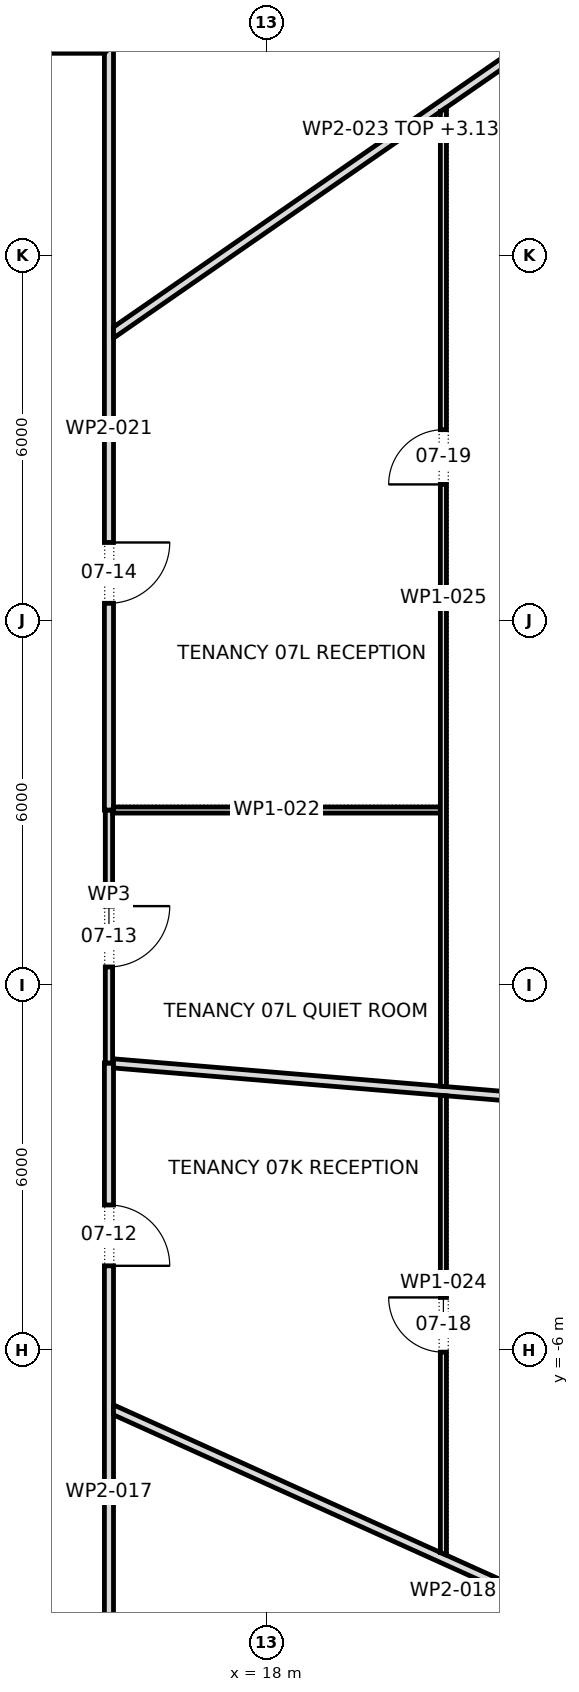
"""IFC4 building model, lengths in metres.
Left out: names, types, materials, properties, quantities, classifications, styles, units other than length and angle.
Written with IfcOpenShell. Run it as: python <this file> out.ifc"""

import sys

from ifc_helpers import new_model, si_unit, direction, frame, frame_2d, origin, place, context, subcontext, project, spatial, polyline, rectangle, outline, extrude, element, fill, save


model = new_model("IFC4")
c1 = context("Model", 3, precision=1e-05, world=origin(), true_north=direction((0.0, 1.0)))
c2 = subcontext(c1, "Body", "Model", "MODEL_VIEW")
j1 = project(units=[si_unit("LENGTHUNIT", "METRE"), si_unit("PLANEANGLEUNIT", "RADIAN")], contexts=[c1])
p1 = place(None, origin())
s1 = spatial("IfcSite", under=j1, at=p1, CompositionType="ELEMENT")
p2 = place(p1, origin())
s2 = spatial("IfcBuilding", under=s1, at=p2, CompositionType="ELEMENT")
p3 = place(p2, frame((0.0, 0.0, 104.5)))
s3 = spatial("IfcBuildingStorey", under=s2, at=p3, CompositionType="ELEMENT", Elevation=104.5)
p4 = place(p3, frame((-15.475, 15.4, 0.0), z_axis=(0.0, 0.0, 1.0), x_axis=(1.0, 0.0, 0.0)))
e1 = element("IfcWall", 1, at=p4, inside=s3, PredefinedType="PARTITIONING", context=c2, shape_type="SweptSolid", body=[
    extrude(outline(polyline([(0.15, -0.075), (2.066, -0.075), (3.981, -0.075), (5.897, -0.075), (7.812, -0.075), (9.728, -0.075), (11.644, -0.075), (13.56, -0.075), (15.475, -0.075), (17.391, -0.075), (19.306, -0.075), (21.222, -0.075), (23.138, -0.075), (25.053, -0.075), (26.969, -0.075), (28.885, -0.075), (30.8, -0.075), (30.95, 0.075), (29.016, 0.075), (27.081, 0.075), (25.147, 0.075), (23.212, 0.075), (21.278, 0.075), (19.344, 0.075), (17.409, 0.075), (15.475, 0.075), (13.541, 0.075), (11.606, 0.075), (9.672, 0.075), (7.738, 0.075), (5.803, 0.075), (3.869, 0.075), (1.935, 0.075), (0.0, 0.075), (0.15, -0.075)])), origin(), (0.0, 0.0, 1.0), 3.9),
])
p5 = place(p4, frame((27.545, 0.0, 0.0)))
e2 = element("IfcOpeningElement", 2, at=p5, cuts=e1, PredefinedType="OPENING", context=c2, shape_type="SweptSolid", body=[
    extrude(rectangle(XDim=1.0, YDim=2.1, at=frame_2d((0.5, 1.05))), frame((0.0, 0.087, 0.0), z_axis=(0.0, -1.0, 0.0), x_axis=(1.0, 0.0, 0.0)), (0.0, 0.0, 1.0), 0.174),
])
p6 = place(p4, frame((18.545, 0.0, 0.0)))
e3 = element("IfcOpeningElement", 3, at=p6, cuts=e1, PredefinedType="OPENING", context=c2, shape_type="SweptSolid", body=[
    extrude(rectangle(XDim=1.8, YDim=2.1, at=frame_2d((0.9, 1.05))), frame((0.0, 0.087, 0.0), z_axis=(0.0, -1.0, 0.0), x_axis=(1.0, 0.0, 0.0)), (0.0, 0.0, 1.0), 0.174),
])
p7 = place(p4, frame((6.195, 0.0, 0.0)))
e4 = element("IfcOpeningElement", 4, at=p7, cuts=e1, PredefinedType="OPENING", context=c2, shape_type="SweptSolid", body=[
    extrude(rectangle(XDim=1.8, YDim=2.1, at=frame_2d((0.9, 1.05))), frame((0.0, 0.087, 0.0), z_axis=(0.0, -1.0, 0.0), x_axis=(1.0, 0.0, 0.0)), (0.0, 0.0, 1.0), 0.174),
])
p8 = place(p3, frame((15.4, -15.475, 0.0), z_axis=(0.0, 0.0, 1.0), x_axis=(0.0, 1.0, 0.0)))
e5 = element("IfcWall", 5, at=p8, inside=s3, PredefinedType="PARTITIONING", context=c2, shape_type="SweptSolid", body=[
    extrude(outline(polyline([(14.195, 0.075), (12.439, 0.075), (10.684, 0.075), (8.928, 0.075), (7.173, 0.075), (5.417, 0.075), (3.661, 0.075), (1.906, 0.075), (0.15, 0.075), (0.0, -0.075), (1.775, -0.075), (3.549, -0.075), (5.323, -0.075), (7.098, -0.075), (8.872, -0.075), (10.646, -0.075), (12.421, -0.075), (14.195, -0.075), (14.195, 0.075)])), origin(), (0.0, 0.0, 1.0), 3.9),
])
p9 = place(p8, frame((3.8, 0.0, 0.0)))
e6 = element("IfcOpeningElement", 6, at=p9, cuts=e5, PredefinedType="OPENING", context=c2, shape_type="SweptSolid", body=[
    extrude(rectangle(XDim=1.0, YDim=2.1, at=frame_2d((0.5, 1.05))), frame((0.0, 0.087, 0.0), z_axis=(0.0, -1.0, 0.0), x_axis=(1.0, 0.0, 0.0)), (0.0, 0.0, 1.0), 0.174),
])
p10 = place(p8, frame((10.86, 0.0, 0.0)))
e7 = element("IfcOpeningElement", 7, at=p10, cuts=e5, PredefinedType="OPENING", context=c2, shape_type="SweptSolid", body=[
    extrude(rectangle(XDim=1.0, YDim=2.1, at=frame_2d((0.5, 1.05))), frame((0.0, 0.087, 0.0), z_axis=(0.0, -1.0, 0.0), x_axis=(1.0, 0.0, 0.0)), (0.0, 0.0, 1.0), 0.174),
])
p11 = place(p3, frame((15.444, -6.97, 0.0), z_axis=(0.0, 0.0, 1.0), x_axis=(0.911385678544, -0.411553331835, 0.0)))
e8 = element("IfcWall", 8, at=p11, inside=s3, PredefinedType="PARTITIONING", context=c2, shape_type="SweptSolid", body=[
    extrude(outline(polyline([(0.068, -0.075), (1.869, -0.075), (3.67, -0.075), (5.471, -0.075), (7.272, -0.075), (9.074, -0.075), (10.875, -0.075), (12.676, -0.075), (14.477, -0.075), (14.495, -0.004), (14.497, 0.058), (14.497, 0.075), (12.778, 0.075), (11.058, 0.075), (9.339, 0.075), (7.62, 0.075), (5.9, 0.075), (5.898, 0.074), (5.898, 0.075), (3.932, 0.075), (1.966, 0.075), (0.0, 0.075), (0.068, -0.075)])), origin(), (0.0, 0.0, 1.0), 2.91),
])
p12 = place(p3, frame((15.454, -1.284, 0.0), z_axis=(0.0, 0.0, 1.0), x_axis=(0.996525641357, -0.083286530234, 0.0)))
e9 = element("IfcWall", 9, at=p12, inside=s3, PredefinedType="PARTITIONING", context=c2, shape_type="SweptSolid", body=[
    extrude(outline(polyline([(0.028, -0.075), (1.905, -0.075), (3.783, -0.075), (5.66, -0.075), (7.538, -0.075), (9.416, -0.075), (11.293, -0.075), (13.171, -0.075), (15.048, -0.075), (16.926, -0.075), (16.931, -0.038), (16.931, 0.075), (15.05, 0.075), (13.169, 0.075), (11.288, 0.075), (9.406, 0.075), (7.525, 0.075), (5.644, 0.075), (3.762, 0.075), (1.881, 0.075), (0.0, 0.075), (0.0, 0.074), (0.006, 0.005), (0.021, 0.006), (0.028, -0.075)])), origin(), (0.0, 0.0, 1.0), 2.91),
])
p13 = place(p3, frame((15.4, 2.88, 0.0), z_axis=(0.0, 0.0, 1.0), x_axis=(0.0, -1.0, 0.0)))
e10 = element("IfcWall", 10, at=p13, inside=s3, PredefinedType="PARTITIONING", context=c2, shape_type="SweptSolid", body=[
    extrude(rectangle(XDim=4.16, YDim=0.12, at=frame_2d((2.08, 0.0))), origin(), (0.0, 0.0, 1.0), 3.9),
])
p14 = place(p13, frame((1.58, 0.0, 0.0)))
e11 = element("IfcOpeningElement", 11, at=p14, cuts=e10, PredefinedType="OPENING", context=c2, shape_type="SweptSolid", body=[
    extrude(rectangle(XDim=1.0, YDim=2.1, at=frame_2d((0.5, 1.05))), frame((0.0, 0.072, 0.0), z_axis=(0.0, -1.0, 0.0), x_axis=(1.0, 0.0, 0.0)), (0.0, 0.0, 1.0), 0.144),
])
p15 = place(p3, frame((15.4, 2.88, 0.0), z_axis=(0.0, 0.0, 1.0), x_axis=(0.0, 1.0, 0.0)))
e12 = element("IfcWall", 12, at=p15, inside=s3, PredefinedType="PARTITIONING", context=c2, shape_type="SweptSolid", body=[
    extrude(outline(polyline([(0.0, -0.075), (1.799, -0.075), (3.599, -0.075), (5.398, -0.075), (7.197, -0.075), (8.996, -0.075), (10.796, -0.075), (12.595, -0.075), (12.445, 0.075), (10.667, 0.075), (8.889, 0.075), (7.112, 0.075), (5.333, 0.075), (3.556, 0.075), (1.778, 0.075), (0.0, 0.075), (0.0, -0.075)])), origin(), (0.0, 0.0, 1.0), 3.9),
])
p16 = place(p15, frame((3.4, 0.0, 0.0)))
e13 = element("IfcOpeningElement", 13, at=p16, cuts=e12, PredefinedType="OPENING", context=c2, shape_type="SweptSolid", body=[
    extrude(rectangle(XDim=1.0, YDim=2.1, at=frame_2d((0.5, 1.05))), frame((0.0, 0.087, 0.0), z_axis=(0.0, -1.0, 0.0), x_axis=(1.0, 0.0, 0.0)), (0.0, 0.0, 1.0), 0.174),
])
p17 = place(p3, frame((15.46, 2.88, 0.0), z_axis=(0.0, 0.0, 1.0), x_axis=(1.0, 0.0, 0.0)))
e14 = element("IfcWall", 14, at=p17, inside=s3, PredefinedType="PARTITIONING", context=c2, shape_type="SweptSolid", body=[
    extrude(outline(polyline([(0.0, -0.05), (1.797, -0.05), (3.593, -0.05), (5.39, -0.05), (5.39, 0.05), (3.598, 0.05), (1.806, 0.05), (0.015, 0.05), (0.015, 0.0), (0.0, 0.0), (0.0, -0.05)])), origin(), (0.0, 0.0, 1.0), 3.9),
])
p18 = place(p3, frame((15.433, 10.702, 0.0), z_axis=(0.0, 0.0, 1.0), x_axis=(0.82202509952, 0.569451258458, 0.0)))
e15 = element("IfcWall", 15, at=p18, inside=s3, PredefinedType="PARTITIONING", context=c2, shape_type="SweptSolid", body=[
    extrude(outline(polyline([(0.0, -0.075), (1.635, -0.075), (3.269, -0.075), (4.904, -0.075), (6.538, -0.075), (6.54, -0.072), (6.544, -0.075), (8.291, -0.075), (10.038, -0.075), (11.785, -0.075), (11.785, -0.071), (11.78, 0.003), (11.761, 0.075), (9.818, 0.075), (7.875, 0.075), (5.932, 0.075), (3.989, 0.075), (2.046, 0.075), (0.104, 0.075), (0.0, -0.074), (0.0, -0.075)])), origin(), (0.0, 0.0, 1.0), 3.13),
])
p19 = place(p3, frame((20.9, -1.811, 0.0), z_axis=(0.0, 0.0, 1.0), x_axis=(0.0, -1.0, 0.0)))
e16 = element("IfcWall", 16, at=p19, inside=s3, PredefinedType="PARTITIONING", context=c2, shape_type="SweptSolid", body=[
    extrude(outline(polyline([(0.0, -0.05), (1.879, -0.05), (3.759, -0.05), (5.638, -0.05), (7.518, -0.05), (7.562, 0.049), (7.562, 0.05), (5.674, 0.05), (3.785, 0.05), (1.897, 0.05), (0.008, 0.05), (0.0, -0.047), (0.0, -0.05)])), origin(), (0.0, 0.0, 1.0), 3.9),
])
p20 = place(p19, frame((3.324, 0.0, 0.0)))
e17 = element("IfcOpeningElement", 17, at=p20, cuts=e16, PredefinedType="OPENING", context=c2, shape_type="SweptSolid", body=[
    extrude(rectangle(XDim=0.9, YDim=2.1, at=frame_2d((0.45, 1.05))), frame((0.0, 0.062, 0.0), z_axis=(0.0, -1.0, 0.0), x_axis=(1.0, 0.0, 0.0)), (0.0, 0.0, 1.0), 0.124),
])
p21 = place(p3, frame((20.9, -1.668, 0.0), z_axis=(0.0, 0.0, 1.0), x_axis=(0.0, 1.0, 0.0)))
e18 = element("IfcWall", 18, at=p21, inside=s3, PredefinedType="PARTITIONING", context=c2, shape_type="SweptSolid", body=[
    extrude(outline(polyline([(16.102, -0.05), (16.102, -0.05), (16.032, 0.05), (14.127, 0.05), (12.221, 0.05), (10.315, 0.05), (8.41, 0.05), (6.504, 0.05), (4.598, 0.05), (4.598, 0.05), (4.499, 0.05), (4.499, 0.05), (3.002, 0.05), (1.505, 0.05), (0.008, 0.05), (0.0, -0.049), (0.0, -0.05), (1.789, -0.05), (3.578, -0.05), (5.367, -0.05), (7.156, -0.05), (8.945, -0.05), (10.734, -0.05), (12.523, -0.05), (14.312, -0.05), (16.102, -0.05)])), origin(), (0.0, 0.0, 1.0), 3.9),
])
p22 = place(p21, frame((9.904, 0.0, 0.0)))
e19 = element("IfcOpeningElement", 19, at=p22, cuts=e18, PredefinedType="OPENING", context=c2, shape_type="SweptSolid", body=[
    extrude(rectangle(XDim=0.9, YDim=2.1, at=frame_2d((0.45, 1.05))), frame((0.0, 0.062, 0.0), z_axis=(0.0, -1.0, 0.0), x_axis=(1.0, 0.0, 0.0)), (0.0, 0.0, 1.0), 0.124),
])
p23 = place(p10, frame((1.0, 0.0, 0.0), z_axis=(0.0, 0.0, 1.0), x_axis=(-1.0, 0.0, 0.0)))
e20 = element("IfcDoor", 20, at=p23, inside=s3, OperationType="SINGLE_SWING_LEFT", PredefinedType="DOOR", context=c2, shape_type="SweptSolid", body=[
    extrude(rectangle(XDim=1.0, YDim=2.1, at=frame_2d((0.5, 1.05))), frame((0.0, 0.025, 0.0), z_axis=(0.0, -1.0, 0.0), x_axis=(1.0, 0.0, 0.0)), (0.0, 0.0, 1.0), 0.05),
])
fill(e7, e20)
p24 = place(p14, origin())
e21 = element("IfcDoor", 21, at=p24, inside=s3, OperationType="SINGLE_SWING_RIGHT", PredefinedType="DOOR", context=c2, shape_type="SweptSolid", body=[
    extrude(rectangle(XDim=1.0, YDim=2.1, at=frame_2d((0.5, 1.05))), frame((0.0, 0.025, 0.0), z_axis=(0.0, -1.0, 0.0), x_axis=(1.0, 0.0, 0.0)), (0.0, 0.0, 1.0), 0.05),
])
fill(e11, e21)
p25 = place(p16, frame((1.0, 0.0, 0.0), z_axis=(0.0, 0.0, 1.0), x_axis=(-1.0, 0.0, 0.0)))
e22 = element("IfcDoor", 22, at=p25, inside=s3, OperationType="SINGLE_SWING_RIGHT", PredefinedType="DOOR", context=c2, shape_type="SweptSolid", body=[
    extrude(rectangle(XDim=1.0, YDim=2.1, at=frame_2d((0.5, 1.05))), frame((0.0, 0.025, 0.0), z_axis=(0.0, -1.0, 0.0), x_axis=(1.0, 0.0, 0.0)), (0.0, 0.0, 1.0), 0.05),
])
fill(e13, e22)
p26 = place(p20, frame((0.9, 0.0, 0.0), z_axis=(0.0, 0.0, 1.0), x_axis=(-1.0, 0.0, 0.0)))
e23 = element("IfcDoor", 23, at=p26, inside=s3, OperationType="SINGLE_SWING_LEFT", PredefinedType="DOOR", context=c2, shape_type="SweptSolid", body=[
    extrude(rectangle(XDim=0.9, YDim=2.1, at=frame_2d((0.45, 1.05))), frame((0.0, 0.025, 0.0), z_axis=(0.0, -1.0, 0.0), x_axis=(1.0, 0.0, 0.0)), (0.0, 0.0, 1.0), 0.05),
])
fill(e17, e23)
p27 = place(p22, origin())
e24 = element("IfcDoor", 24, at=p27, inside=s3, OperationType="SINGLE_SWING_RIGHT", PredefinedType="DOOR", context=c2, shape_type="SweptSolid", body=[
    extrude(rectangle(XDim=0.9, YDim=2.1, at=frame_2d((0.45, 1.05))), frame((0.0, 0.025, 0.0), z_axis=(0.0, -1.0, 0.0), x_axis=(1.0, 0.0, 0.0)), (0.0, 0.0, 1.0), 0.05),
])
fill(e19, e24)
save(model, sys.argv[1])
